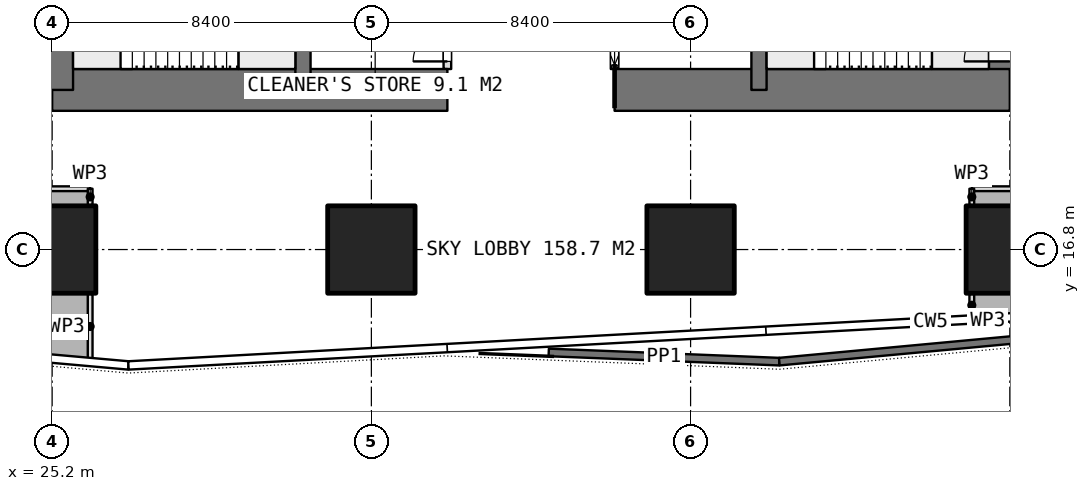
"""IFC4 building model, lengths in metres.
Left out: names, types, materials, properties, quantities, classifications, styles, units other than length and angle.
Written with IfcOpenShell. Run it as: python <this file> out.ifc"""

import sys

from ifc_helpers import new_model, si_unit, direction, frame, frame_2d, origin, origin_2d, place, context, subcontext, project, spatial, rectangle, extrude, element, fill, save


model = new_model("IFC4")
c1 = context("Model", 3, precision=1e-05, world=origin(), true_north=direction((0.0, 1.0)))
c2 = subcontext(c1, "Body", "Model", "MODEL_VIEW")
j1 = project(units=[si_unit("LENGTHUNIT", "METRE"), si_unit("PLANEANGLEUNIT", "RADIAN")], contexts=[c1])
p1 = place(None, origin())
s1 = spatial("IfcSite", under=j1, at=p1, CompositionType="ELEMENT")
p2 = place(p1, origin())
s2 = spatial("IfcBuilding", under=s1, at=p2, CompositionType="ELEMENT")
p3 = place(p2, frame((0.0, 0.0, 245.6)))
s3 = spatial("IfcBuildingStorey", under=s2, at=p3, CompositionType="ELEMENT", Elevation=245.6)
p4 = place(p3, frame((25.2, 21.0, 0.0), z_axis=(0.0, 0.0, 1.0), x_axis=(1.0, 0.0, 0.0)))
e1 = element("IfcWall", 1, at=p4, inside=s3, PredefinedType="SHEAR", context=c2, shape_type="SweptSolid", body=[
    extrude(rectangle(XDim=10.4, YDim=1.1, at=frame_2d((5.2, 0.0))), origin(), (0.0, 0.0, 1.0), 4.5),
])
p5 = place(p3, frame((40.0, 21.0, 0.0), z_axis=(0.0, 0.0, 1.0), x_axis=(1.0, 0.0, 0.0)))
e2 = element("IfcWall", 2, at=p5, inside=s3, PredefinedType="SHEAR", context=c2, shape_type="SweptSolid", body=[
    extrude(rectangle(XDim=10.4, YDim=1.1, at=frame_2d((5.2, 0.0))), origin(), (0.0, 0.0, 1.0), 4.5),
])
p6 = place(p3, frame((25.2, 21.0, 0.0), z_axis=(0.0, 0.0, 1.0), x_axis=(0.0, 1.0, 0.0)))
e3 = element("IfcWall", 3, at=p6, inside=s3, PredefinedType="SHEAR", context=c2, shape_type="SweptSolid", body=[
    extrude(rectangle(XDim=25.2, YDim=1.1, at=frame_2d((12.6, 0.0))), origin(), (0.0, 0.0, 1.0), 4.5),
])
p7 = place(p6, frame((7.8, 0.0, 0.0)))
e4 = element("IfcOpeningElement", 4, at=p7, cuts=e3, PredefinedType="OPENING", context=c2, shape_type="SweptSolid", body=[
    extrude(rectangle(XDim=1.2, YDim=2.1, at=frame_2d((0.6, 1.05))), frame((0.0, 0.56, 0.0), z_axis=(0.0, -1.0, 0.0), x_axis=(1.0, 0.0, 0.0)), (0.0, 0.0, 1.0), 1.12),
])
p8 = place(p6, frame((14.25, 0.0, 0.0)))
e5 = element("IfcOpeningElement", 5, at=p8, cuts=e3, PredefinedType="OPENING", context=c2, shape_type="SweptSolid", body=[
    extrude(rectangle(XDim=0.9, YDim=2.1, at=frame_2d((0.45, 1.05))), frame((0.0, 0.56, 0.0), z_axis=(0.0, -1.0, 0.0), x_axis=(1.0, 0.0, 0.0)), (0.0, 0.0, 1.0), 1.12),
])
p9 = place(p6, frame((16.85, 0.0, 0.0)))
e6 = element("IfcOpeningElement", 6, at=p9, cuts=e3, PredefinedType="OPENING", context=c2, shape_type="SweptSolid", body=[
    extrude(rectangle(XDim=0.9, YDim=2.1, at=frame_2d((0.45, 1.05))), frame((0.0, 0.56, 0.0), z_axis=(0.0, -1.0, 0.0), x_axis=(1.0, 0.0, 0.0)), (0.0, 0.0, 1.0), 1.12),
])
p10 = place(p6, frame((19.0, 0.0, 0.0)))
e7 = element("IfcOpeningElement", 7, at=p10, cuts=e3, PredefinedType="OPENING", context=c2, shape_type="SweptSolid", body=[
    extrude(rectangle(XDim=1.2, YDim=2.1, at=frame_2d((0.6, 1.05))), frame((0.0, 0.56, 0.0), z_axis=(0.0, -1.0, 0.0), x_axis=(1.0, 0.0, 0.0)), (0.0, 0.0, 1.0), 1.12),
])
p11 = place(p3, frame((50.4, 21.0, 0.0), z_axis=(0.0, 0.0, 1.0), x_axis=(0.0, 1.0, 0.0)))
e8 = element("IfcWall", 8, at=p11, inside=s3, PredefinedType="SHEAR", context=c2, shape_type="SweptSolid", body=[
    extrude(rectangle(XDim=25.2, YDim=1.1, at=frame_2d((12.6, 0.0))), origin(), (0.0, 0.0, 1.0), 4.5),
])
p12 = place(p11, frame((16.2, 0.0, 0.0)))
e9 = element("IfcOpeningElement", 9, at=p12, cuts=e8, PredefinedType="OPENING", context=c2, shape_type="SweptSolid", body=[
    extrude(rectangle(XDim=1.2, YDim=2.1, at=frame_2d((0.6, 1.05))), frame((0.0, 0.56, 0.0), z_axis=(0.0, -1.0, 0.0), x_axis=(1.0, 0.0, 0.0)), (0.0, 0.0, 1.0), 1.12),
])
p13 = place(p11, frame((10.05, 0.0, 0.0)))
e10 = element("IfcOpeningElement", 10, at=p13, cuts=e8, PredefinedType="OPENING", context=c2, shape_type="SweptSolid", body=[
    extrude(rectangle(XDim=0.9, YDim=2.1, at=frame_2d((0.45, 1.05))), frame((0.0, 0.56, 0.0), z_axis=(0.0, -1.0, 0.0), x_axis=(1.0, 0.0, 0.0)), (0.0, 0.0, 1.0), 1.12),
])
p14 = place(p11, frame((7.45, 0.0, 0.0)))
e11 = element("IfcOpeningElement", 11, at=p14, cuts=e8, PredefinedType="OPENING", context=c2, shape_type="SweptSolid", body=[
    extrude(rectangle(XDim=0.9, YDim=2.1, at=frame_2d((0.45, 1.05))), frame((0.0, 0.56, 0.0), z_axis=(0.0, -1.0, 0.0), x_axis=(1.0, 0.0, 0.0)), (0.0, 0.0, 1.0), 1.12),
])
p15 = place(p11, frame((0.75, 0.0, 0.0)))
e12 = element("IfcOpeningElement", 12, at=p15, cuts=e8, PredefinedType="OPENING", context=c2, shape_type="SweptSolid", body=[
    extrude(rectangle(XDim=1.2, YDim=2.1, at=frame_2d((0.6, 1.05))), frame((0.0, 0.56, 0.0), z_axis=(0.0, -1.0, 0.0), x_axis=(1.0, 0.0, 0.0)), (0.0, 0.0, 1.0), 1.12),
])
for number, where, z_axis, x_axis in (
    (13, (31.8, 21.0, 0.0), (0.0, 0.0, 1.0), (0.0, 1.0, 0.0)),
    (14, (43.8, 21.0, 0.0), (0.0, 0.0, 1.0), (0.0, 1.0, 0.0)),
):
    element("IfcWall", number, at=place(p3, frame(where, z_axis=z_axis, x_axis=x_axis)), inside=s3, PredefinedType="SHEAR", context=c2, shape_type="SweptSolid", body=[
        extrude(rectangle(XDim=25.2, YDim=0.4, at=frame_2d((12.6, 0.0))), origin(), (0.0, 0.0, 1.0), 4.5),
    ])
for number, where, z_axis, x_axis in (
    (15, (25.2, 16.8, 0.0), (0.0, 0.0, 1.0), (1.0, 0.0, 0.0)),
    (16, (33.6, 16.8, 0.0), (0.0, 0.0, 1.0), (1.0, 0.0, 0.0)),
    (17, (42.0, 16.8, 0.0), (0.0, 0.0, 1.0), (1.0, 0.0, 0.0)),
    (18, (50.4, 16.8, 0.0), (0.0, 0.0, 1.0), (1.0, 0.0, 0.0)),
):
    element("IfcColumn", number, at=place(p3, frame(where, z_axis=z_axis, x_axis=x_axis)), inside=s3, PredefinedType="COLUMN", context=c2, shape_type="SweptSolid", body=[
        extrude(rectangle(XDim=2.3, YDim=2.3, at=origin_2d()), origin(), (0.0, 0.0, 1.0), 4.5),
    ])
p16 = place(p3, frame((38.267, 14.093, 0.0), z_axis=(0.0, 0.0, 1.0), x_axis=(0.999204422948, -0.03988133852, 0.0)))
e19 = element("IfcWall", 19, at=p16, inside=s3, PredefinedType="PARAPET", context=c2, shape_type="SweptSolid", body=[
    extrude(rectangle(XDim=6.073, YDim=0.2, at=frame_2d((3.036, 0.0))), origin(), (0.0, 0.0, 1.0), 1.1),
])
p17 = place(p3, frame((44.335, 13.85, 0.0), z_axis=(0.0, 0.0, 1.0), x_axis=(0.995693191073, 0.092709596322, 0.0)))
e20 = element("IfcWall", 20, at=p17, inside=s3, PredefinedType="PARAPET", context=c2, shape_type="SweptSolid", body=[
    extrude(rectangle(XDim=14.884, YDim=0.2, at=frame_2d((7.442, 0.0))), origin(), (0.0, 0.0, 1.0), 1.1),
])
p18 = place(p3, frame((40.0, 21.55, 0.0), z_axis=(0.0, 0.0, 1.0), x_axis=(0.0, 1.0, 0.0)))
e21 = element("IfcWall", 21, at=p18, inside=s3, PredefinedType="PARTITIONING", context=c2, shape_type="SweptSolid", body=[
    extrude(rectangle(XDim=1.65, YDim=0.2, at=frame_2d((0.825, 0.0))), origin(), (0.0, 0.0, 1.0), 4.25),
])
p19 = place(p18, frame((0.1, 0.0, 0.0)))
e22 = element("IfcOpeningElement", 22, at=p19, cuts=e21, PredefinedType="OPENING", context=c2, shape_type="SweptSolid", body=[
    extrude(rectangle(XDim=1.1, YDim=2.1, at=frame_2d((0.55, 1.05))), frame((0.0, 0.11, 0.0), z_axis=(0.0, -1.0, 0.0), x_axis=(1.0, 0.0, 0.0)), (0.0, 0.0, 1.0), 0.22),
])
p20 = place(p3, frame((35.6, 21.55, 0.0), z_axis=(0.0, 0.0, 1.0), x_axis=(0.0, 1.0, 0.0)))
e23 = element("IfcWall", 23, at=p20, inside=s3, PredefinedType="PARTITIONING", context=c2, shape_type="SweptSolid", body=[
    extrude(rectangle(XDim=1.65, YDim=0.2, at=frame_2d((0.825, 0.0))), origin(), (0.0, 0.0, 1.0), 4.25),
])
p21 = place(p20, frame((0.2, 0.0, 0.0)))
e24 = element("IfcOpeningElement", 24, at=p21, cuts=e23, PredefinedType="OPENING", context=c2, shape_type="SweptSolid", body=[
    extrude(rectangle(XDim=0.9, YDim=2.1, at=frame_2d((0.45, 1.05))), frame((0.0, 0.11, 0.0), z_axis=(0.0, -1.0, 0.0), x_axis=(1.0, 0.0, 0.0)), (0.0, 0.0, 1.0), 0.22),
])
p22 = place(p3, frame((49.4, 18.4, 0.0), z_axis=(0.0, 0.0, 1.0), x_axis=(1.0, 0.0, 0.0)))
e25 = element("IfcWall", 25, at=p22, inside=s3, PredefinedType="PARTITIONING", context=c2, shape_type="SweptSolid", body=[
    extrude(rectangle(XDim=7.0, YDim=0.125, at=frame_2d((3.5, 0.0))), origin(), (0.0, 0.0, 1.0), 4.25),
])
p23 = place(p22, frame((2.6, 0.0, 0.0)))
e26 = element("IfcOpeningElement", 26, at=p23, cuts=e25, PredefinedType="OPENING", context=c2, shape_type="SweptSolid", body=[
    extrude(rectangle(XDim=1.8, YDim=2.1, at=frame_2d((0.9, 1.05))), frame((0.0, 0.073, 0.0), z_axis=(0.0, -1.0, 0.0), x_axis=(1.0, 0.0, 0.0)), (0.0, 0.0, 1.0), 0.145),
])
p24 = place(p3, frame((49.4, 15.039, 0.0), z_axis=(0.0, 0.0, 1.0), x_axis=(0.0, 1.0, 0.0)))
e27 = element("IfcWall", 27, at=p24, inside=s3, PredefinedType="PARTITIONING", context=c2, shape_type="SweptSolid", body=[
    extrude(rectangle(XDim=0.591, YDim=0.125, at=frame_2d((0.295, 0.0))), origin(), (0.0, 0.0, 1.0), 4.25),
])
p25 = place(p3, frame((49.4, 17.97, 0.0), z_axis=(0.0, 0.0, 1.0), x_axis=(0.0, 1.0, 0.0)))
e28 = element("IfcWall", 28, at=p25, inside=s3, PredefinedType="PARTITIONING", context=c2, shape_type="SweptSolid", body=[
    extrude(rectangle(XDim=0.43, YDim=0.125, at=frame_2d((0.215, 0.0))), origin(), (0.0, 0.0, 1.0), 4.25),
])
p26 = place(p3, frame((19.2, 18.4, 0.0), z_axis=(0.0, 0.0, 1.0), x_axis=(1.0, 0.0, 0.0)))
e29 = element("IfcWall", 29, at=p26, inside=s3, PredefinedType="PARTITIONING", context=c2, shape_type="SweptSolid", body=[
    extrude(rectangle(XDim=7.0, YDim=0.125, at=frame_2d((3.5, 0.0))), origin(), (0.0, 0.0, 1.0), 4.25),
])
p27 = place(p26, frame((2.6, 0.0, 0.0)))
e30 = element("IfcOpeningElement", 30, at=p27, cuts=e29, PredefinedType="OPENING", context=c2, shape_type="SweptSolid", body=[
    extrude(rectangle(XDim=1.8, YDim=2.1, at=frame_2d((0.9, 1.05))), frame((0.0, 0.073, 0.0), z_axis=(0.0, -1.0, 0.0), x_axis=(1.0, 0.0, 0.0)), (0.0, 0.0, 1.0), 0.145),
])
p28 = place(p3, frame((26.2, 18.4, 0.0), z_axis=(0.0, 0.0, 1.0), x_axis=(0.0, -1.0, 0.0)))
e31 = element("IfcWall", 31, at=p28, inside=s3, PredefinedType="PARTITIONING", context=c2, shape_type="SweptSolid", body=[
    extrude(rectangle(XDim=0.43, YDim=0.125, at=frame_2d((0.215, 0.0))), origin(), (0.0, 0.0, 1.0), 4.25),
])
p29 = place(p3, frame((26.2, 15.63, 0.0), z_axis=(0.0, 0.0, 1.0), x_axis=(0.0, -1.0, 0.0)))
e32 = element("IfcWall", 32, at=p29, inside=s3, PredefinedType="PARTITIONING", context=c2, shape_type="SweptSolid", body=[
    extrude(rectangle(XDim=1.71, YDim=0.125, at=frame_2d((0.855, 0.0))), origin(), (0.0, 0.0, 1.0), 4.25),
])
p30 = place(p19, origin())
e33 = element("IfcDoor", 33, at=p30, inside=s3, OperationType="SLIDING_TO_LEFT", PredefinedType="DOOR", context=c2, shape_type="SweptSolid", body=[
    extrude(rectangle(XDim=1.1, YDim=2.1, at=frame_2d((0.55, 1.05))), frame((0.0, 0.025, 0.0), z_axis=(0.0, -1.0, 0.0), x_axis=(1.0, 0.0, 0.0)), (0.0, 0.0, 1.0), 0.05),
])
fill(e22, e33)
p31 = place(p21, origin())
e34 = element("IfcDoor", 34, at=p31, inside=s3, OperationType="SINGLE_SWING_LEFT", PredefinedType="DOOR", context=c2, shape_type="SweptSolid", body=[
    extrude(rectangle(XDim=0.9, YDim=2.1, at=frame_2d((0.45, 1.05))), frame((0.0, 0.025, 0.0), z_axis=(0.0, -1.0, 0.0), x_axis=(1.0, 0.0, 0.0)), (0.0, 0.0, 1.0), 0.05),
])
fill(e24, e34)
p32 = place(p15, origin())
e35 = element("IfcDoor", 35, at=p32, inside=s3, OperationType="SINGLE_SWING_RIGHT", PredefinedType="DOOR", context=c2, shape_type="SweptSolid", body=[
    extrude(rectangle(XDim=1.2, YDim=2.1, at=frame_2d((0.6, 1.05))), frame((0.0, 0.025, 0.0), z_axis=(0.0, -1.0, 0.0), x_axis=(1.0, 0.0, 0.0)), (0.0, 0.0, 1.0), 0.05),
])
fill(e12, e35)
save(model, sys.argv[1])
